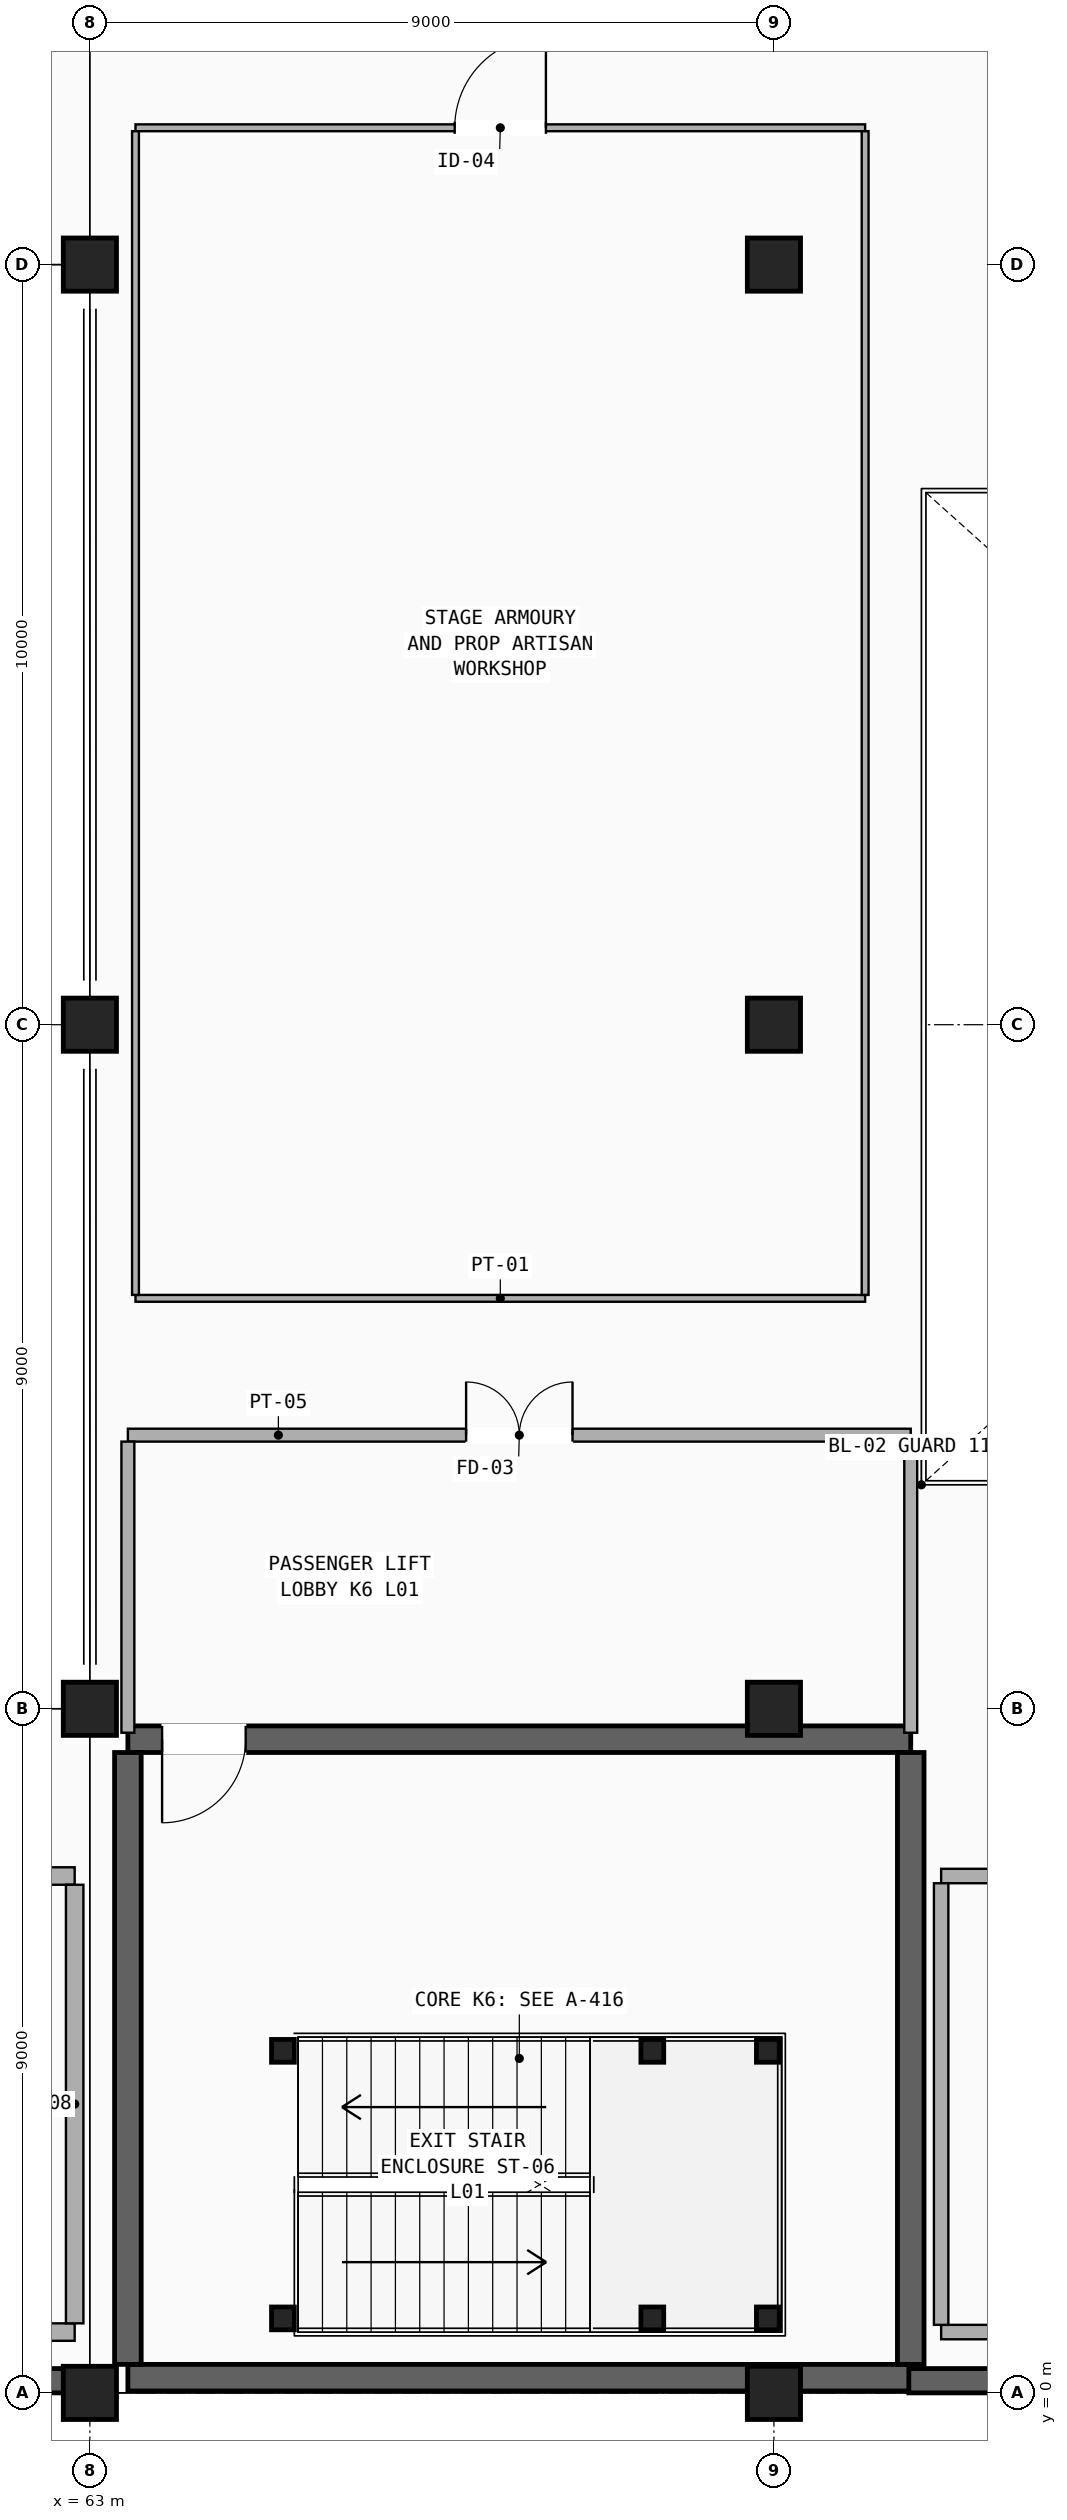
"""IFC4 building model, lengths in metres.
Left out: names, types, materials, properties, quantities, classifications, styles, units other than length and angle.
Written with IfcOpenShell. Run it as: python <this file> out.ifc"""

import sys

from ifc_helpers import new_model, si_unit, direction, frame, frame_2d, origin, origin_2d, place, context, subcontext, project, spatial, rectangle, hollow_rectangle, extrude, element, fill, save


model = new_model("IFC4")
c1 = context("Model", 3, precision=1e-05, world=origin(), true_north=direction((0.0, 1.0)))
c2 = subcontext(c1, "Body", "Model", "MODEL_VIEW")
j1 = project(units=[si_unit("LENGTHUNIT", "METRE"), si_unit("PLANEANGLEUNIT", "RADIAN")], contexts=[c1])
p1 = place(None, origin())
s1 = spatial("IfcSite", under=j1, at=p1, CompositionType="ELEMENT")
p2 = place(p1, origin())
s2 = spatial("IfcBuilding", under=s1, at=p2, CompositionType="ELEMENT")
p3 = place(p2, frame((0.0, 0.0, 5.1)))
s3 = spatial("IfcBuildingStorey", under=s2, at=p3, CompositionType="ELEMENT", Elevation=5.1)
for number, where, z_axis, x_axis in (
    (1, (63.0, 0.0, 0.0), (0.0, 0.0, 1.0), (1.0, 0.0, 0.0)),
    (2, (63.0, 9.0, 0.0), (0.0, 0.0, 1.0), (1.0, 0.0, 0.0)),
    (3, (63.0, 18.0, 0.0), (0.0, 0.0, 1.0), (1.0, 0.0, 0.0)),
    (4, (63.0, 28.0, 0.0), (0.0, 0.0, 1.0), (1.0, 0.0, 0.0)),
    (5, (72.0, 0.0, 0.0), (0.0, 0.0, 1.0), (1.0, 0.0, 0.0)),
    (6, (72.0, 9.0, 0.0), (0.0, 0.0, 1.0), (1.0, 0.0, 0.0)),
    (7, (72.0, 18.0, 0.0), (0.0, 0.0, 1.0), (1.0, 0.0, 0.0)),
    (8, (72.0, 28.0, 0.0), (0.0, 0.0, 1.0), (1.0, 0.0, 0.0)),
):
    element("IfcColumn", number, at=place(p3, frame(where, z_axis=z_axis, x_axis=x_axis)), inside=s3, PredefinedType="COLUMN", context=c2, shape_type="SweptSolid", body=[
        extrude(rectangle(XDim=0.7, YDim=0.7, at=origin_2d()), origin(), (0.0, 0.0, 1.0), 4.42),
    ])
p4 = place(p3, frame((63.5, 0.2, 0.0), z_axis=(0.0, 0.0, 1.0), x_axis=(1.0, 0.0, 0.0)))
e9 = element("IfcWall", 9, at=p4, inside=s3, PredefinedType="SHEAR", context=c2, shape_type="SweptSolid", body=[
    extrude(rectangle(XDim=10.3, YDim=0.35, at=frame_2d((5.15, 0.0))), origin(), (0.0, 0.0, 1.0), 4.42),
])
p5 = place(p3, frame((63.5, 8.6, 0.0), z_axis=(0.0, 0.0, 1.0), x_axis=(1.0, 0.0, 0.0)))
e10 = element("IfcWall", 10, at=p5, inside=s3, PredefinedType="SHEAR", context=c2, shape_type="SweptSolid", body=[
    extrude(rectangle(XDim=10.3, YDim=0.35, at=frame_2d((5.15, 0.0))), origin(), (0.0, 0.0, 1.0), 4.42),
])
p6 = place(p5, frame((0.45, 0.0, 0.0)))
e11 = element("IfcOpeningElement", 11, at=p6, cuts=e10, PredefinedType="OPENING", context=c2, shape_type="SweptSolid", body=[
    extrude(rectangle(XDim=1.1, YDim=2.2, at=frame_2d((0.55, 1.1))), frame((0.0, 0.185, 0.0), z_axis=(0.0, -1.0, 0.0), x_axis=(1.0, 0.0, 0.0)), (0.0, 0.0, 1.0), 0.37),
])
for number, where, z_axis, x_axis in (
    (12, (63.5, 0.375, 0.0), (0.0, 0.0, 1.0), (0.0, 1.0, 0.0)),
    (13, (73.8, 0.375, 0.0), (0.0, 0.0, 1.0), (0.0, 1.0, 0.0)),
):
    element("IfcWall", number, at=place(p3, frame(where, z_axis=z_axis, x_axis=x_axis)), inside=s3, PredefinedType="SHEAR", context=c2, shape_type="SweptSolid", body=[
        extrude(rectangle(XDim=8.05, YDim=0.35, at=frame_2d((4.025, 0.0))), origin(), (0.0, 0.0, 1.0), 4.42),
    ])
p7 = place(p3, frame((0.35, 0.16, 0.0), z_axis=(0.0, 0.0, 1.0), x_axis=(1.0, 0.0, 0.0)))
e14 = element("IfcWall", 14, at=p7, inside=s3, PredefinedType="SHEAR", context=c2, shape_type="SweptSolid", body=[
    extrude(rectangle(XDim=62.95, YDim=0.32, at=frame_2d((31.475, 0.0))), origin(), (0.0, 0.0, 1.0), 4.42),
])
p8 = place(p3, frame((73.775, 0.16, 0.0), z_axis=(0.0, 0.0, 1.0), x_axis=(1.0, 0.0, 0.0)))
e15 = element("IfcWall", 15, at=p8, inside=s3, PredefinedType="SHEAR", context=c2, shape_type="SweptSolid", body=[
    extrude(rectangle(XDim=89.875, YDim=0.32, at=frame_2d((44.938, 0.0))), origin(), (0.0, 0.0, 1.0), 4.42),
])
for number, where, z_axis, x_axis in (
    (16, (65.54, 0.98, 0.0), (0.0, 0.0, 1.0), (1.0, 0.0, 0.0)),
    (17, (65.54, 4.5, 0.0), (0.0, 0.0, 1.0), (1.0, 0.0, 0.0)),
    (18, (70.4, 0.98, 0.0), (0.0, 0.0, 1.0), (1.0, 0.0, 0.0)),
    (19, (70.4, 4.5, 0.0), (0.0, 0.0, 1.0), (1.0, 0.0, 0.0)),
    (20, (71.92, 0.98, 0.0), (0.0, 0.0, 1.0), (1.0, 0.0, 0.0)),
    (21, (71.92, 4.5, 0.0), (0.0, 0.0, 1.0), (1.0, 0.0, 0.0)),
):
    element("IfcColumn", number, at=place(p3, frame(where, z_axis=z_axis, x_axis=x_axis)), inside=s3, PredefinedType="COLUMN", context=c2, shape_type="SweptSolid", body=[
        extrude(hollow_rectangle(XDim=0.3, YDim=0.3, WallThickness=0.016, InnerFilletRadius=0.016, OuterFilletRadius=0.032, at=origin_2d()), origin(), (0.0, 0.0, 1.0), 4.42),
    ])
p9 = place(p3, frame((63.5, 12.6, 0.0), z_axis=(0.0, 0.0, 1.0), x_axis=(1.0, 0.0, 0.0)))
e22 = element("IfcWall", 22, at=p9, inside=s3, PredefinedType="PARTITIONING", context=c2, shape_type="SweptSolid", body=[
    extrude(rectangle(XDim=10.3, YDim=0.17, at=frame_2d((5.15, 0.0))), origin(), (0.0, 0.0, 1.0), 3.44),
])
p10 = place(p9, frame((4.45, 0.0, 0.0)))
e23 = element("IfcOpeningElement", 23, at=p10, cuts=e22, PredefinedType="OPENING", context=c2, shape_type="SweptSolid", body=[
    extrude(rectangle(XDim=1.4, YDim=2.2, at=frame_2d((0.7, 1.1))), frame((0.0, 0.095, 0.0), z_axis=(0.0, -1.0, 0.0), x_axis=(1.0, 0.0, 0.0)), (0.0, 0.0, 1.0), 0.19),
])
p11 = place(p3, frame((63.5, 8.685, 0.0), z_axis=(0.0, 0.0, 1.0), x_axis=(0.0, 1.0, 0.0)))
e24 = element("IfcWall", 24, at=p11, inside=s3, PredefinedType="PARTITIONING", context=c2, shape_type="SweptSolid", body=[
    extrude(rectangle(XDim=3.83, YDim=0.17, at=frame_2d((1.915, 0.0))), origin(), (0.0, 0.0, 1.0), 3.24),
])
p12 = place(p3, frame((73.8, 8.685, 0.0), z_axis=(0.0, 0.0, 1.0), x_axis=(0.0, 1.0, 0.0)))
e25 = element("IfcWall", 25, at=p12, inside=s3, PredefinedType="PARTITIONING", context=c2, shape_type="SweptSolid", body=[
    extrude(rectangle(XDim=3.83, YDim=0.17, at=frame_2d((1.915, 0.0))), origin(), (0.0, 0.0, 1.0), 3.14),
])
p13 = place(p3, frame((38.4, 0.8, 0.0), z_axis=(0.0, 0.0, 1.0), x_axis=(1.0, 0.0, 0.0)))
e26 = element("IfcWall", 26, at=p13, inside=s3, PredefinedType="PARTITIONING", context=c2, shape_type="SweptSolid", body=[
    extrude(rectangle(XDim=24.4, YDim=0.23, at=frame_2d((12.2, 0.0))), origin(), (0.0, 0.0, 1.0), 3.44),
])
p14 = place(p3, frame((38.4, 6.8, 0.0), z_axis=(0.0, 0.0, 1.0), x_axis=(1.0, 0.0, 0.0)))
e27 = element("IfcWall", 27, at=p14, inside=s3, PredefinedType="PARTITIONING", context=c2, shape_type="SweptSolid", body=[
    extrude(rectangle(XDim=24.4, YDim=0.23, at=frame_2d((12.2, 0.0))), origin(), (0.0, 0.0, 1.0), 3.44),
])
p15 = place(p14, frame((11.7, 0.0, 0.0)))
e28 = element("IfcOpeningElement", 28, at=p15, cuts=e27, PredefinedType="OPENING", context=c2, shape_type="SweptSolid", body=[
    extrude(rectangle(XDim=1.0, YDim=2.15, at=frame_2d((0.5, 1.075))), frame((0.0, 0.125, 0.0), z_axis=(0.0, -1.0, 0.0), x_axis=(1.0, 0.0, 0.0)), (0.0, 0.0, 1.0), 0.25),
])
p16 = place(p14, frame((5.368, 0.0, 0.0)))
e29 = element("IfcOpeningElement", 29, at=p16, cuts=e27, PredefinedType="OPENING", context=c2, shape_type="SweptSolid", body=[
    extrude(rectangle(XDim=1.0, YDim=2.15, at=frame_2d((0.5, 1.075))), frame((0.0, 0.125, 0.0), z_axis=(0.0, -1.0, 0.0), x_axis=(1.0, 0.0, 0.0)), (0.0, 0.0, 1.0), 0.25),
])
p17 = place(p3, frame((62.8, 0.915, 0.0), z_axis=(0.0, 0.0, 1.0), x_axis=(0.0, 1.0, 0.0)))
e30 = element("IfcWall", 30, at=p17, inside=s3, PredefinedType="PARTITIONING", context=c2, shape_type="SweptSolid", body=[
    extrude(rectangle(XDim=5.77, YDim=0.23, at=frame_2d((2.885, 0.0))), origin(), (0.0, 0.0, 1.0), 3.44),
])
p18 = place(p3, frame((63.6, 14.4, 0.0), z_axis=(0.0, 0.0, 1.0), x_axis=(1.0, 0.0, 0.0)))
e31 = element("IfcWall", 31, at=p18, inside=s3, PredefinedType="PARTITIONING", context=c2, shape_type="SweptSolid", body=[
    extrude(rectangle(XDim=9.6, YDim=0.09, at=frame_2d((4.8, 0.0))), origin(), (0.0, 0.0, 1.0), 3.44),
])
p19 = place(p3, frame((63.6, 29.8, 0.0), z_axis=(0.0, 0.0, 1.0), x_axis=(1.0, 0.0, 0.0)))
e32 = element("IfcWall", 32, at=p19, inside=s3, PredefinedType="PARTITIONING", context=c2, shape_type="SweptSolid", body=[
    extrude(rectangle(XDim=9.6, YDim=0.09, at=frame_2d((4.8, 0.0))), origin(), (0.0, 0.0, 1.0), 3.49),
])
p20 = place(p19, frame((4.2, 0.0, 0.0)))
e33 = element("IfcOpeningElement", 33, at=p20, cuts=e32, PredefinedType="OPENING", context=c2, shape_type="SweptSolid", body=[
    extrude(rectangle(XDim=1.2, YDim=2.2, at=frame_2d((0.6, 1.1))), frame((0.0, 0.055, 0.0), z_axis=(0.0, -1.0, 0.0), x_axis=(1.0, 0.0, 0.0)), (0.0, 0.0, 1.0), 0.11),
])
p21 = place(p3, frame((63.6, 14.445, 0.0), z_axis=(0.0, 0.0, 1.0), x_axis=(0.0, 1.0, 0.0)))
e34 = element("IfcWall", 34, at=p21, inside=s3, PredefinedType="PARTITIONING", context=c2, shape_type="SweptSolid", body=[
    extrude(rectangle(XDim=15.31, YDim=0.09, at=frame_2d((7.655, 0.0))), origin(), (0.0, 0.0, 1.0), 3.14),
])
p22 = place(p3, frame((73.2, 14.445, 0.0), z_axis=(0.0, 0.0, 1.0), x_axis=(0.0, 1.0, 0.0)))
e35 = element("IfcWall", 35, at=p22, inside=s3, PredefinedType="PARTITIONING", context=c2, shape_type="SweptSolid", body=[
    extrude(rectangle(XDim=15.31, YDim=0.09, at=frame_2d((7.655, 0.0))), origin(), (0.0, 0.0, 1.0), 3.24),
])
p23 = place(p3, frame((74.2, 0.8, 0.0), z_axis=(0.0, 0.0, 1.0), x_axis=(1.0, 0.0, 0.0)))
e36 = element("IfcWall", 36, at=p23, inside=s3, PredefinedType="PARTITIONING", context=c2, shape_type="SweptSolid", body=[
    extrude(rectangle(XDim=33.0, YDim=0.19, at=frame_2d((16.5, 0.0))), origin(), (0.0, 0.0, 1.0), 3.46),
])
p24 = place(p3, frame((74.2, 6.8, 0.0), z_axis=(0.0, 0.0, 1.0), x_axis=(1.0, 0.0, 0.0)))
e37 = element("IfcWall", 37, at=p24, inside=s3, PredefinedType="PARTITIONING", context=c2, shape_type="SweptSolid", body=[
    extrude(rectangle(XDim=33.0, YDim=0.19, at=frame_2d((16.5, 0.0))), origin(), (0.0, 0.0, 1.0), 3.46),
])
p25 = place(p24, frame((13.578, 0.0, 0.0)))
e38 = element("IfcOpeningElement", 38, at=p25, cuts=e37, PredefinedType="OPENING", context=c2, shape_type="SweptSolid", body=[
    extrude(rectangle(XDim=1.2, YDim=2.2, at=frame_2d((0.6, 1.1))), frame((0.0, 0.105, 0.0), z_axis=(0.0, -1.0, 0.0), x_axis=(1.0, 0.0, 0.0)), (0.0, 0.0, 1.0), 0.21),
])
p26 = place(p24, frame((23.22, 0.0, 0.0)))
e39 = element("IfcOpeningElement", 39, at=p26, cuts=e37, PredefinedType="OPENING", context=c2, shape_type="SweptSolid", body=[
    extrude(rectangle(XDim=1.2, YDim=2.2, at=frame_2d((0.6, 1.1))), frame((0.0, 0.105, 0.0), z_axis=(0.0, -1.0, 0.0), x_axis=(1.0, 0.0, 0.0)), (0.0, 0.0, 1.0), 0.21),
])
p27 = place(p3, frame((74.2, 0.895, 0.0), z_axis=(0.0, 0.0, 1.0), x_axis=(0.0, 1.0, 0.0)))
e40 = element("IfcWall", 40, at=p27, inside=s3, PredefinedType="PARTITIONING", context=c2, shape_type="SweptSolid", body=[
    extrude(rectangle(XDim=5.81, YDim=0.19, at=frame_2d((2.905, 0.0))), origin(), (0.0, 0.0, 1.0), 4.16),
])
p28 = place(p6, frame((1.1, 0.0, 0.0), z_axis=(0.0, 0.0, 1.0), x_axis=(-1.0, 0.0, 0.0)))
e41 = element("IfcDoor", 41, at=p28, inside=s3, OperationType="SINGLE_SWING_RIGHT", PredefinedType="DOOR", context=c2, shape_type="SweptSolid", body=[
    extrude(rectangle(XDim=1.1, YDim=2.2, at=frame_2d((0.55, 1.1))), frame((0.0, 0.025, 0.0), z_axis=(0.0, -1.0, 0.0), x_axis=(1.0, 0.0, 0.0)), (0.0, 0.0, 1.0), 0.05),
])
fill(e11, e41)
p29 = place(p10, origin())
e42 = element("IfcDoor", 42, at=p29, inside=s3, OperationType="DOUBLE_DOOR_SINGLE_SWING", PredefinedType="DOOR", context=c2, shape_type="SweptSolid", body=[
    extrude(rectangle(XDim=1.4, YDim=2.2, at=frame_2d((0.7, 1.1))), frame((0.0, 0.025, 0.0), z_axis=(0.0, -1.0, 0.0), x_axis=(1.0, 0.0, 0.0)), (0.0, 0.0, 1.0), 0.05),
])
fill(e23, e42)
p30 = place(p20, origin())
e43 = element("IfcDoor", 43, at=p30, inside=s3, OperationType="SINGLE_SWING_RIGHT", PredefinedType="DOOR", context=c2, shape_type="SweptSolid", body=[
    extrude(rectangle(XDim=1.2, YDim=2.2, at=frame_2d((0.6, 1.1))), frame((0.0, 0.025, 0.0), z_axis=(0.0, -1.0, 0.0), x_axis=(1.0, 0.0, 0.0)), (0.0, 0.0, 1.0), 0.05),
])
fill(e33, e43)
save(model, sys.argv[1])
